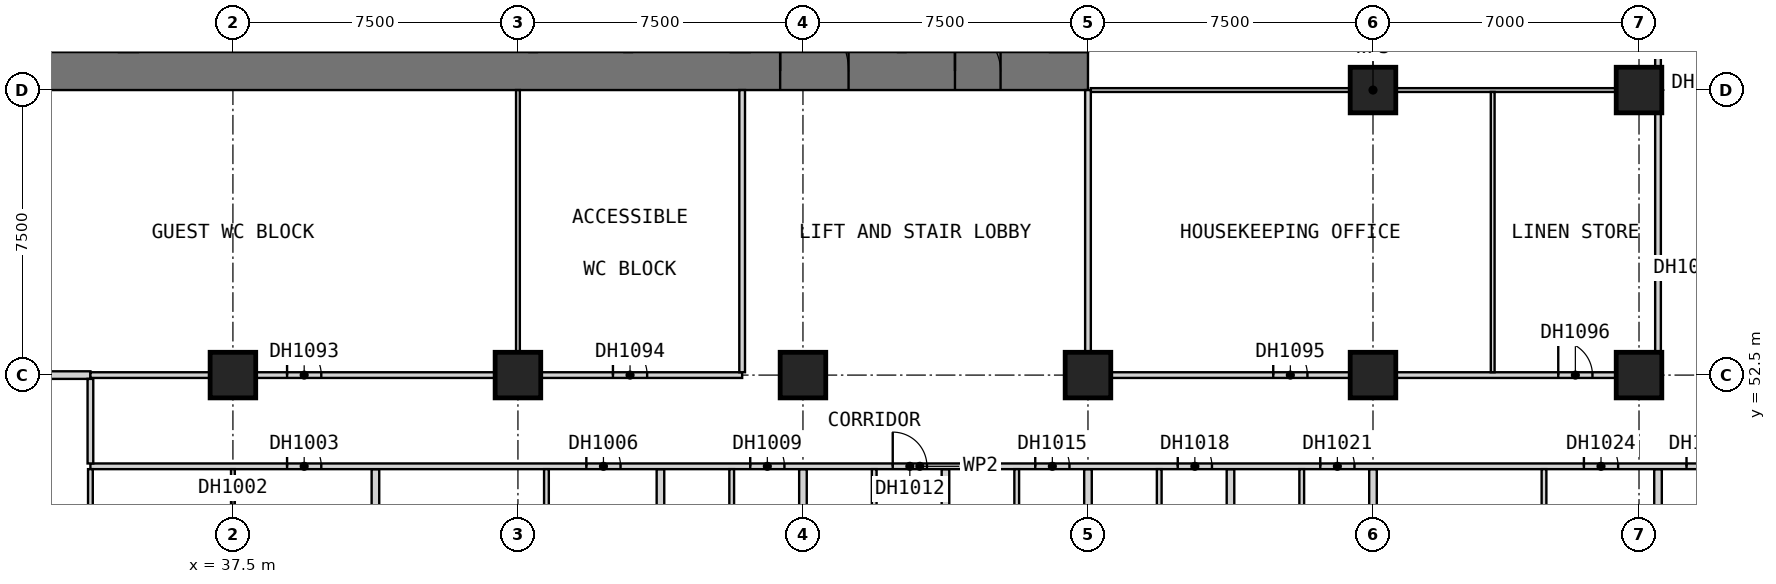
"""IFC4 building model, lengths in metres.
Left out: names, types, materials, properties, quantities, classifications, styles, units other than length and angle.
Written with IfcOpenShell. Run it as: python <this file> out.ifc"""

import sys

from ifc_helpers import new_model, si_unit, direction, frame, frame_2d, origin, origin_2d, place, context, subcontext, project, spatial, rectangle, extrude, element, fill, save


model = new_model("IFC4")
c1 = context("Model", 3, precision=1e-05, world=origin(), true_north=direction((0.0, 1.0)))
c2 = subcontext(c1, "Body", "Model", "MODEL_VIEW")
j1 = project(units=[si_unit("LENGTHUNIT", "METRE"), si_unit("PLANEANGLEUNIT", "RADIAN")], contexts=[c1])
p1 = place(None, origin())
s1 = spatial("IfcSite", under=j1, at=p1, CompositionType="ELEMENT")
p2 = place(p1, origin())
s2 = spatial("IfcBuilding", under=s1, at=p2, CompositionType="ELEMENT")
p3 = place(p2, frame((0.0, 0.0, 48.4)))
s3 = spatial("IfcBuildingStorey", under=s2, at=p3, CompositionType="ELEMENT", Elevation=48.4)
for number, where, z_axis, x_axis in (
    (1, (37.5, 52.5, 0.0), (0.0, 0.0, 1.0), (1.0, 0.0, 0.0)),
    (2, (45.0, 52.5, 0.0), (0.0, 0.0, 1.0), (1.0, 0.0, 0.0)),
    (3, (52.5, 52.5, 0.0), (0.0, 0.0, 1.0), (1.0, 0.0, 0.0)),
    (4, (60.0, 52.5, 0.0), (0.0, 0.0, 1.0), (1.0, 0.0, 0.0)),
    (5, (67.5, 52.5, 0.0), (0.0, 0.0, 1.0), (1.0, 0.0, 0.0)),
    (6, (67.5, 60.0, 0.0), (0.0, 0.0, 1.0), (1.0, 0.0, 0.0)),
    (7, (74.5, 52.5, 0.0), (0.0, 0.0, 1.0), (1.0, 0.0, 0.0)),
    (8, (74.5, 60.0, 0.0), (0.0, 0.0, 1.0), (1.0, 0.0, 0.0)),
):
    element("IfcColumn", number, at=place(p3, frame(where, z_axis=z_axis, x_axis=x_axis)), inside=s3, PredefinedType="COLUMN", context=c2, shape_type="SweptSolid", body=[
        extrude(rectangle(XDim=1.2, YDim=1.2, at=origin_2d()), origin(), (0.0, 0.0, 1.0), 3.6),
    ])
p4 = place(p3, frame((30.0, 60.5, 0.0), z_axis=(0.0, 0.0, 1.0), x_axis=(1.0, 0.0, 0.0)))
e9 = element("IfcWall", 9, at=p4, inside=s3, PredefinedType="SHEAR", context=c2, shape_type="SweptSolid", body=[
    extrude(rectangle(XDim=30.0, YDim=1.0, at=frame_2d((15.0, 0.0))), origin(), (0.0, 0.0, 1.0), 3.6),
])
p5 = place(p4, frame((21.9, 0.0, 0.0)))
e10 = element("IfcOpeningElement", 10, at=p5, cuts=e9, PredefinedType="OPENING", context=c2, shape_type="SweptSolid", body=[
    extrude(rectangle(XDim=1.8, YDim=2.1, at=frame_2d((0.9, 1.05))), frame((0.0, 0.51, 0.0), z_axis=(0.0, -1.0, 0.0), x_axis=(1.0, 0.0, 0.0)), (0.0, 0.0, 1.0), 1.02),
])
p6 = place(p4, frame((26.5, 0.0, 0.0)))
e11 = element("IfcOpeningElement", 11, at=p6, cuts=e9, PredefinedType="OPENING", context=c2, shape_type="SweptSolid", body=[
    extrude(rectangle(XDim=1.2, YDim=2.1, at=frame_2d((0.6, 1.05))), frame((0.0, 0.51, 0.0), z_axis=(0.0, -1.0, 0.0), x_axis=(1.0, 0.0, 0.0)), (0.0, 0.0, 1.0), 1.02),
])
p7 = place(p3, frame((30.0, 52.5, 0.0), z_axis=(0.0, 0.0, 1.0), x_axis=(1.0, 0.0, 0.0)))
e12 = element("IfcWall", 12, at=p7, inside=s3, PredefinedType="PARTITIONING", context=c2, shape_type="SweptSolid", body=[
    extrude(rectangle(XDim=3.75, YDim=0.2, at=frame_2d((1.875, 0.0))), origin(), (0.0, 0.0, 1.0), 3.35),
])
for number, where, z_axis, x_axis in (
    (13, (41.25, 38.31, 0.0), (0.0, 0.0, 1.0), (0.0, 1.0, 0.0)),
    (14, (48.75, 38.31, 0.0), (0.0, 0.0, 1.0), (0.0, 1.0, 0.0)),
):
    element("IfcWall", number, at=place(p3, frame(where, z_axis=z_axis, x_axis=x_axis)), inside=s3, PredefinedType="PARTITIONING", context=c2, shape_type="SweptSolid", body=[
        extrude(rectangle(XDim=11.715, YDim=0.2, at=frame_2d((5.857, 0.0))), origin(), (0.0, 0.0, 1.0), 3.35),
    ])
p8 = place(p3, frame((52.5, 37.5, 0.0), z_axis=(0.0, 0.0, 1.0), x_axis=(0.0, 1.0, 0.0)))
e15 = element("IfcWall", 15, at=p8, inside=s3, PredefinedType="PARTITIONING", context=c2, shape_type="SweptSolid", body=[
    extrude(rectangle(XDim=12.525, YDim=0.2, at=frame_2d((6.262, 0.0))), origin(), (0.0, 0.0, 1.0), 3.35),
])
p9 = place(p3, frame((56.25, 38.31, 0.0), z_axis=(0.0, 0.0, 1.0), x_axis=(0.0, 1.0, 0.0)))
e16 = element("IfcWall", 16, at=p9, inside=s3, PredefinedType="PARTITIONING", context=c2, shape_type="SweptSolid", body=[
    extrude(rectangle(XDim=11.715, YDim=0.2, at=frame_2d((5.857, 0.0))), origin(), (0.0, 0.0, 1.0), 3.35),
])
p10 = place(p3, frame((60.0, 37.5, 0.0), z_axis=(0.0, 0.0, 1.0), x_axis=(0.0, 1.0, 0.0)))
e17 = element("IfcWall", 17, at=p10, inside=s3, PredefinedType="PARTITIONING", context=c2, shape_type="SweptSolid", body=[
    extrude(rectangle(XDim=12.525, YDim=0.2, at=frame_2d((6.262, 0.0))), origin(), (0.0, 0.0, 1.0), 3.35),
])
p11 = place(p3, frame((63.75, 38.31, 0.0), z_axis=(0.0, 0.0, 1.0), x_axis=(0.0, 1.0, 0.0)))
e18 = element("IfcWall", 18, at=p11, inside=s3, PredefinedType="PARTITIONING", context=c2, shape_type="SweptSolid", body=[
    extrude(rectangle(XDim=11.715, YDim=0.2, at=frame_2d((5.857, 0.0))), origin(), (0.0, 0.0, 1.0), 3.35),
])
p12 = place(p3, frame((67.5, 37.5, 0.0), z_axis=(0.0, 0.0, 1.0), x_axis=(0.0, 1.0, 0.0)))
e19 = element("IfcWall", 19, at=p12, inside=s3, PredefinedType="PARTITIONING", context=c2, shape_type="SweptSolid", body=[
    extrude(rectangle(XDim=12.525, YDim=0.2, at=frame_2d((6.262, 0.0))), origin(), (0.0, 0.0, 1.0), 3.35),
])
p13 = place(p3, frame((75.0, 38.31, 0.0), z_axis=(0.0, 0.0, 1.0), x_axis=(0.0, 1.0, 0.0)))
e20 = element("IfcWall", 20, at=p13, inside=s3, PredefinedType="PARTITIONING", context=c2, shape_type="SweptSolid", body=[
    extrude(rectangle(XDim=11.715, YDim=0.2, at=frame_2d((5.857, 0.0))), origin(), (0.0, 0.0, 1.0), 3.35),
])
p14 = place(p3, frame((33.75, 50.1, 0.0), z_axis=(0.0, 0.0, 1.0), x_axis=(1.0, 0.0, 0.0)))
e21 = element("IfcWall", 21, at=p14, inside=s3, PredefinedType="PARTITIONING", context=c2, shape_type="SweptSolid", body=[
    extrude(rectangle(XDim=43.65, YDim=0.15, at=frame_2d((21.825, 0.0))), origin(), (0.0, 0.0, 1.0), 3.35),
])
p15 = place(p14, frame((5.175, 0.0, 0.0)))
e22 = element("IfcOpeningElement", 22, at=p15, cuts=e21, PredefinedType="OPENING", context=c2, shape_type="SweptSolid", body=[
    extrude(rectangle(XDim=0.9, YDim=2.1, at=frame_2d((0.45, 1.05))), frame((0.0, 0.085, 0.0), z_axis=(0.0, -1.0, 0.0), x_axis=(1.0, 0.0, 0.0)), (0.0, 0.0, 1.0), 0.17),
])
p16 = place(p14, frame((13.05, 0.0, 0.0)))
e23 = element("IfcOpeningElement", 23, at=p16, cuts=e21, PredefinedType="OPENING", context=c2, shape_type="SweptSolid", body=[
    extrude(rectangle(XDim=0.9, YDim=2.1, at=frame_2d((0.45, 1.05))), frame((0.0, 0.085, 0.0), z_axis=(0.0, -1.0, 0.0), x_axis=(1.0, 0.0, 0.0)), (0.0, 0.0, 1.0), 0.17),
])
p17 = place(p14, frame((17.363, 0.0, 0.0)))
e24 = element("IfcOpeningElement", 24, at=p17, cuts=e21, PredefinedType="OPENING", context=c2, shape_type="SweptSolid", body=[
    extrude(rectangle(XDim=0.9, YDim=2.1, at=frame_2d((0.45, 1.05))), frame((0.0, 0.085, 0.0), z_axis=(0.0, -1.0, 0.0), x_axis=(1.0, 0.0, 0.0)), (0.0, 0.0, 1.0), 0.17),
])
p18 = place(p14, frame((21.113, 0.0, 0.0)))
e25 = element("IfcOpeningElement", 25, at=p18, cuts=e21, PredefinedType="OPENING", context=c2, shape_type="SweptSolid", body=[
    extrude(rectangle(XDim=0.9, YDim=2.1, at=frame_2d((0.45, 1.05))), frame((0.0, 0.085, 0.0), z_axis=(0.0, -1.0, 0.0), x_axis=(1.0, 0.0, 0.0)), (0.0, 0.0, 1.0), 0.17),
])
p19 = place(p14, frame((24.863, 0.0, 0.0)))
e26 = element("IfcOpeningElement", 26, at=p19, cuts=e21, PredefinedType="OPENING", context=c2, shape_type="SweptSolid", body=[
    extrude(rectangle(XDim=0.9, YDim=2.1, at=frame_2d((0.45, 1.05))), frame((0.0, 0.085, 0.0), z_axis=(0.0, -1.0, 0.0), x_axis=(1.0, 0.0, 0.0)), (0.0, 0.0, 1.0), 0.17),
])
p20 = place(p14, frame((28.613, 0.0, 0.0)))
e27 = element("IfcOpeningElement", 27, at=p20, cuts=e21, PredefinedType="OPENING", context=c2, shape_type="SweptSolid", body=[
    extrude(rectangle(XDim=0.9, YDim=2.1, at=frame_2d((0.45, 1.05))), frame((0.0, 0.085, 0.0), z_axis=(0.0, -1.0, 0.0), x_axis=(1.0, 0.0, 0.0)), (0.0, 0.0, 1.0), 0.17),
])
p21 = place(p14, frame((32.363, 0.0, 0.0)))
e28 = element("IfcOpeningElement", 28, at=p21, cuts=e21, PredefinedType="OPENING", context=c2, shape_type="SweptSolid", body=[
    extrude(rectangle(XDim=0.9, YDim=2.1, at=frame_2d((0.45, 1.05))), frame((0.0, 0.085, 0.0), z_axis=(0.0, -1.0, 0.0), x_axis=(1.0, 0.0, 0.0)), (0.0, 0.0, 1.0), 0.17),
])
p22 = place(p14, frame((39.3, 0.0, 0.0)))
e29 = element("IfcOpeningElement", 29, at=p22, cuts=e21, PredefinedType="OPENING", context=c2, shape_type="SweptSolid", body=[
    extrude(rectangle(XDim=0.9, YDim=2.1, at=frame_2d((0.45, 1.05))), frame((0.0, 0.085, 0.0), z_axis=(0.0, -1.0, 0.0), x_axis=(1.0, 0.0, 0.0)), (0.0, 0.0, 1.0), 0.17),
])
p23 = place(p14, frame((42.0, 0.0, 0.0)))
e30 = element("IfcOpeningElement", 30, at=p23, cuts=e21, PredefinedType="OPENING", context=c2, shape_type="SweptSolid", body=[
    extrude(rectangle(XDim=0.9, YDim=2.1, at=frame_2d((0.45, 1.05))), frame((0.0, 0.085, 0.0), z_axis=(0.0, -1.0, 0.0), x_axis=(1.0, 0.0, 0.0)), (0.0, 0.0, 1.0), 0.17),
])
p24 = place(p3, frame((33.75, 52.5, 0.0), z_axis=(0.0, 0.0, 1.0), x_axis=(1.0, 0.0, 0.0)))
e31 = element("IfcWall", 31, at=p24, inside=s3, PredefinedType="PARTITIONING", context=c2, shape_type="SweptSolid", body=[
    extrude(rectangle(XDim=17.15, YDim=0.15, at=frame_2d((8.575, 0.0))), origin(), (0.0, 0.0, 1.0), 3.35),
])
p25 = place(p24, frame((5.175, 0.0, 0.0)))
e32 = element("IfcOpeningElement", 32, at=p25, cuts=e31, PredefinedType="OPENING", context=c2, shape_type="SweptSolid", body=[
    extrude(rectangle(XDim=0.9, YDim=2.1, at=frame_2d((0.45, 1.05))), frame((0.0, 0.085, 0.0), z_axis=(0.0, -1.0, 0.0), x_axis=(1.0, 0.0, 0.0)), (0.0, 0.0, 1.0), 0.17),
])
p26 = place(p24, frame((13.75, 0.0, 0.0)))
e33 = element("IfcOpeningElement", 33, at=p26, cuts=e31, PredefinedType="OPENING", context=c2, shape_type="SweptSolid", body=[
    extrude(rectangle(XDim=0.9, YDim=2.1, at=frame_2d((0.45, 1.05))), frame((0.0, 0.085, 0.0), z_axis=(0.0, -1.0, 0.0), x_axis=(1.0, 0.0, 0.0)), (0.0, 0.0, 1.0), 0.17),
])
p27 = place(p3, frame((60.0, 52.5, 0.0), z_axis=(0.0, 0.0, 1.0), x_axis=(1.0, 0.0, 0.0)))
e34 = element("IfcWall", 34, at=p27, inside=s3, PredefinedType="PARTITIONING", context=c2, shape_type="SweptSolid", body=[
    extrude(rectangle(XDim=15.0, YDim=0.15, at=frame_2d((7.5, 0.0))), origin(), (0.0, 0.0, 1.0), 3.35),
])
p28 = place(p27, frame((4.875, 0.0, 0.0)))
e35 = element("IfcOpeningElement", 35, at=p28, cuts=e34, PredefinedType="OPENING", context=c2, shape_type="SweptSolid", body=[
    extrude(rectangle(XDim=0.9, YDim=2.1, at=frame_2d((0.45, 1.05))), frame((0.0, 0.085, 0.0), z_axis=(0.0, -1.0, 0.0), x_axis=(1.0, 0.0, 0.0)), (0.0, 0.0, 1.0), 0.17),
])
p29 = place(p27, frame((12.375, 0.0, 0.0)))
e36 = element("IfcOpeningElement", 36, at=p29, cuts=e34, PredefinedType="OPENING", context=c2, shape_type="SweptSolid", body=[
    extrude(rectangle(XDim=0.9, YDim=2.1, at=frame_2d((0.45, 1.05))), frame((0.0, 0.085, 0.0), z_axis=(0.0, -1.0, 0.0), x_axis=(1.0, 0.0, 0.0)), (0.0, 0.0, 1.0), 0.17),
])
p30 = place(p3, frame((33.75, 50.175, 0.0), z_axis=(0.0, 0.0, 1.0), x_axis=(0.0, 1.0, 0.0)))
e37 = element("IfcWall", 37, at=p30, inside=s3, PredefinedType="PARTITIONING", context=c2, shape_type="SweptSolid", body=[
    extrude(rectangle(XDim=2.225, YDim=0.15, at=frame_2d((1.112, 0.0))), origin(), (0.0, 0.0, 1.0), 3.35),
])
p31 = place(p3, frame((75.0, 52.575, 0.0), z_axis=(0.0, 0.0, 1.0), x_axis=(0.0, 1.0, 0.0)))
e38 = element("IfcWall", 38, at=p31, inside=s3, PredefinedType="PARTITIONING", context=c2, shape_type="SweptSolid", body=[
    extrude(rectangle(XDim=11.85, YDim=0.15, at=frame_2d((5.925, 0.0))), origin(), (0.0, 0.0, 1.0), 3.35),
])
p32 = place(p31, frame((9.225, 0.0, 0.0)))
e39 = element("IfcOpeningElement", 39, at=p32, cuts=e38, PredefinedType="OPENING", context=c2, shape_type="SweptSolid", body=[
    extrude(rectangle(XDim=0.9, YDim=2.1, at=frame_2d((0.45, 1.05))), frame((0.0, 0.085, 0.0), z_axis=(0.0, -1.0, 0.0), x_axis=(1.0, 0.0, 0.0)), (0.0, 0.0, 1.0), 0.17),
])
p33 = place(p3, frame((60.075, 60.0, 0.0), z_axis=(0.0, 0.0, 1.0), x_axis=(1.0, 0.0, 0.0)))
e40 = element("IfcWall", 40, at=p33, inside=s3, PredefinedType="PARTITIONING", context=c2, shape_type="SweptSolid", body=[
    extrude(rectangle(XDim=14.85, YDim=0.1, at=frame_2d((7.425, 0.0))), origin(), (0.0, 0.0, 1.0), 3.35),
])
p34 = place(p3, frame((37.5, 45.8, 0.0), z_axis=(0.0, 0.0, 1.0), x_axis=(0.0, 1.0, 0.0)))
e41 = element("IfcWall", 41, at=p34, inside=s3, PredefinedType="PARTITIONING", context=c2, shape_type="SweptSolid", body=[
    extrude(rectangle(XDim=4.225, YDim=0.1, at=frame_2d((2.112, 0.0))), origin(), (0.0, 0.0, 1.0), 3.35),
])
p35 = place(p34, frame((1.675, 0.0, 0.0)))
e42 = element("IfcOpeningElement", 42, at=p35, cuts=e41, PredefinedType="OPENING", context=c2, shape_type="SweptSolid", body=[
    extrude(rectangle(XDim=0.9, YDim=2.1, at=frame_2d((0.45, 1.05))), frame((0.0, 0.06, 0.0), z_axis=(0.0, -1.0, 0.0), x_axis=(1.0, 0.0, 0.0)), (0.0, 0.0, 1.0), 0.12),
])
p36 = place(p3, frame((45.0, 52.575, 0.0), z_axis=(0.0, 0.0, 1.0), x_axis=(0.0, 1.0, 0.0)))
e43 = element("IfcWall", 43, at=p36, inside=s3, PredefinedType="PARTITIONING", context=c2, shape_type="SweptSolid", body=[
    extrude(rectangle(XDim=7.425, YDim=0.1, at=frame_2d((3.712, 0.0))), origin(), (0.0, 0.0, 1.0), 3.35),
])
p37 = place(p3, frame((70.65, 52.575, 0.0), z_axis=(0.0, 0.0, 1.0), x_axis=(0.0, 1.0, 0.0)))
e44 = element("IfcWall", 44, at=p37, inside=s3, PredefinedType="PARTITIONING", context=c2, shape_type="SweptSolid", body=[
    extrude(rectangle(XDim=7.375, YDim=0.1, at=frame_2d((3.688, 0.0))), origin(), (0.0, 0.0, 1.0), 3.35),
])
for number, where, z_axis, x_axis in (
    (45, (33.75, 45.812, 0.0), (0.0, 0.0, 1.0), (0.0, 1.0, 0.0)),
    (46, (45.75, 45.812, 0.0), (0.0, 0.0, 1.0), (0.0, 1.0, 0.0)),
    (47, (50.625, 45.812, 0.0), (0.0, 0.0, 1.0), (0.0, 1.0, 0.0)),
    (48, (54.375, 45.812, 0.0), (0.0, 0.0, 1.0), (0.0, 1.0, 0.0)),
    (49, (58.125, 45.812, 0.0), (0.0, 0.0, 1.0), (0.0, 1.0, 0.0)),
    (50, (61.875, 45.812, 0.0), (0.0, 0.0, 1.0), (0.0, 1.0, 0.0)),
    (51, (65.625, 45.812, 0.0), (0.0, 0.0, 1.0), (0.0, 1.0, 0.0)),
    (52, (72.0, 45.812, 0.0), (0.0, 0.0, 1.0), (0.0, 1.0, 0.0)),
):
    element("IfcWall", number, at=place(p3, frame(where, z_axis=z_axis, x_axis=x_axis)), inside=s3, PredefinedType="PARTITIONING", context=c2, shape_type="SweptSolid", body=[
        extrude(rectangle(XDim=4.212, YDim=0.125, at=frame_2d((2.106, 0.0))), origin(), (0.0, 0.0, 1.0), 3.35),
    ])
for number, where, z_axis, x_axis in (
    (53, (50.9, 52.575, 0.0), (0.0, 0.0, 1.0), (0.0, 1.0, 0.0)),
    (54, (60.0, 52.575, 0.0), (0.0, 0.0, 1.0), (0.0, 1.0, 0.0)),
):
    element("IfcWall", number, at=place(p3, frame(where, z_axis=z_axis, x_axis=x_axis)), inside=s3, PredefinedType="PARTITIONING", context=c2, shape_type="SweptSolid", body=[
        extrude(rectangle(XDim=7.425, YDim=0.15, at=frame_2d((3.712, 0.0))), origin(), (0.0, 0.0, 1.0), 3.35),
    ])
p38 = place(p5, origin())
e55 = element("IfcDoor", 55, at=p38, inside=s3, OperationType="DOUBLE_DOOR_SINGLE_SWING", PredefinedType="DOOR", context=c2, shape_type="SweptSolid", body=[
    extrude(rectangle(XDim=1.8, YDim=2.1, at=frame_2d((0.9, 1.05))), frame((0.0, 0.025, 0.0), z_axis=(0.0, -1.0, 0.0), x_axis=(1.0, 0.0, 0.0)), (0.0, 0.0, 1.0), 0.05),
])
fill(e10, e55)
p39 = place(p6, origin())
e56 = element("IfcDoor", 56, at=p39, inside=s3, OperationType="SINGLE_SWING_LEFT", PredefinedType="DOOR", context=c2, shape_type="SweptSolid", body=[
    extrude(rectangle(XDim=1.2, YDim=2.1, at=frame_2d((0.6, 1.05))), frame((0.0, 0.025, 0.0), z_axis=(0.0, -1.0, 0.0), x_axis=(1.0, 0.0, 0.0)), (0.0, 0.0, 1.0), 0.05),
])
fill(e11, e56)
p40 = place(p15, origin())
e57 = element("IfcDoor", 57, at=p40, inside=s3, OperationType="SINGLE_SWING_RIGHT", PredefinedType="DOOR", context=c2, shape_type="SweptSolid", body=[
    extrude(rectangle(XDim=0.9, YDim=2.1, at=frame_2d((0.45, 1.05))), frame((0.0, 0.025, 0.0), z_axis=(0.0, -1.0, 0.0), x_axis=(1.0, 0.0, 0.0)), (0.0, 0.0, 1.0), 0.05),
])
fill(e22, e57)
p41 = place(p16, origin())
e58 = element("IfcDoor", 58, at=p41, inside=s3, OperationType="SINGLE_SWING_RIGHT", PredefinedType="DOOR", context=c2, shape_type="SweptSolid", body=[
    extrude(rectangle(XDim=0.9, YDim=2.1, at=frame_2d((0.45, 1.05))), frame((0.0, 0.025, 0.0), z_axis=(0.0, -1.0, 0.0), x_axis=(1.0, 0.0, 0.0)), (0.0, 0.0, 1.0), 0.05),
])
fill(e23, e58)
p42 = place(p17, origin())
e59 = element("IfcDoor", 59, at=p42, inside=s3, OperationType="SINGLE_SWING_RIGHT", PredefinedType="DOOR", context=c2, shape_type="SweptSolid", body=[
    extrude(rectangle(XDim=0.9, YDim=2.1, at=frame_2d((0.45, 1.05))), frame((0.0, 0.025, 0.0), z_axis=(0.0, -1.0, 0.0), x_axis=(1.0, 0.0, 0.0)), (0.0, 0.0, 1.0), 0.05),
])
fill(e24, e59)
p43 = place(p18, origin())
e60 = element("IfcDoor", 60, at=p43, inside=s3, OperationType="SINGLE_SWING_RIGHT", PredefinedType="DOOR", context=c2, shape_type="SweptSolid", body=[
    extrude(rectangle(XDim=0.9, YDim=2.1, at=frame_2d((0.45, 1.05))), frame((0.0, 0.025, 0.0), z_axis=(0.0, -1.0, 0.0), x_axis=(1.0, 0.0, 0.0)), (0.0, 0.0, 1.0), 0.05),
])
fill(e25, e60)
p44 = place(p19, origin())
e61 = element("IfcDoor", 61, at=p44, inside=s3, OperationType="SINGLE_SWING_RIGHT", PredefinedType="DOOR", context=c2, shape_type="SweptSolid", body=[
    extrude(rectangle(XDim=0.9, YDim=2.1, at=frame_2d((0.45, 1.05))), frame((0.0, 0.025, 0.0), z_axis=(0.0, -1.0, 0.0), x_axis=(1.0, 0.0, 0.0)), (0.0, 0.0, 1.0), 0.05),
])
fill(e26, e61)
p45 = place(p20, origin())
e62 = element("IfcDoor", 62, at=p45, inside=s3, OperationType="SINGLE_SWING_RIGHT", PredefinedType="DOOR", context=c2, shape_type="SweptSolid", body=[
    extrude(rectangle(XDim=0.9, YDim=2.1, at=frame_2d((0.45, 1.05))), frame((0.0, 0.025, 0.0), z_axis=(0.0, -1.0, 0.0), x_axis=(1.0, 0.0, 0.0)), (0.0, 0.0, 1.0), 0.05),
])
fill(e27, e62)
p46 = place(p21, origin())
e63 = element("IfcDoor", 63, at=p46, inside=s3, OperationType="SINGLE_SWING_RIGHT", PredefinedType="DOOR", context=c2, shape_type="SweptSolid", body=[
    extrude(rectangle(XDim=0.9, YDim=2.1, at=frame_2d((0.45, 1.05))), frame((0.0, 0.025, 0.0), z_axis=(0.0, -1.0, 0.0), x_axis=(1.0, 0.0, 0.0)), (0.0, 0.0, 1.0), 0.05),
])
fill(e28, e63)
p47 = place(p22, origin())
e64 = element("IfcDoor", 64, at=p47, inside=s3, OperationType="SINGLE_SWING_RIGHT", PredefinedType="DOOR", context=c2, shape_type="SweptSolid", body=[
    extrude(rectangle(XDim=0.9, YDim=2.1, at=frame_2d((0.45, 1.05))), frame((0.0, 0.025, 0.0), z_axis=(0.0, -1.0, 0.0), x_axis=(1.0, 0.0, 0.0)), (0.0, 0.0, 1.0), 0.05),
])
fill(e29, e64)
p48 = place(p23, origin())
e65 = element("IfcDoor", 65, at=p48, inside=s3, OperationType="SINGLE_SWING_LEFT", PredefinedType="DOOR", context=c2, shape_type="SweptSolid", body=[
    extrude(rectangle(XDim=0.9, YDim=2.1, at=frame_2d((0.45, 1.05))), frame((0.0, 0.025, 0.0), z_axis=(0.0, -1.0, 0.0), x_axis=(1.0, 0.0, 0.0)), (0.0, 0.0, 1.0), 0.05),
])
fill(e30, e65)
p49 = place(p25, origin())
e66 = element("IfcDoor", 66, at=p49, inside=s3, OperationType="SINGLE_SWING_LEFT", PredefinedType="DOOR", context=c2, shape_type="SweptSolid", body=[
    extrude(rectangle(XDim=0.9, YDim=2.1, at=frame_2d((0.45, 1.05))), frame((0.0, 0.025, 0.0), z_axis=(0.0, -1.0, 0.0), x_axis=(1.0, 0.0, 0.0)), (0.0, 0.0, 1.0), 0.05),
])
fill(e32, e66)
p50 = place(p26, origin())
e67 = element("IfcDoor", 67, at=p50, inside=s3, OperationType="SINGLE_SWING_LEFT", PredefinedType="DOOR", context=c2, shape_type="SweptSolid", body=[
    extrude(rectangle(XDim=0.9, YDim=2.1, at=frame_2d((0.45, 1.05))), frame((0.0, 0.025, 0.0), z_axis=(0.0, -1.0, 0.0), x_axis=(1.0, 0.0, 0.0)), (0.0, 0.0, 1.0), 0.05),
])
fill(e33, e67)
p51 = place(p28, origin())
e68 = element("IfcDoor", 68, at=p51, inside=s3, OperationType="SINGLE_SWING_RIGHT", PredefinedType="DOOR", context=c2, shape_type="SweptSolid", body=[
    extrude(rectangle(XDim=0.9, YDim=2.1, at=frame_2d((0.45, 1.05))), frame((0.0, 0.025, 0.0), z_axis=(0.0, -1.0, 0.0), x_axis=(1.0, 0.0, 0.0)), (0.0, 0.0, 1.0), 0.05),
])
fill(e35, e68)
p52 = place(p29, origin())
e69 = element("IfcDoor", 69, at=p52, inside=s3, OperationType="SINGLE_SWING_RIGHT", PredefinedType="DOOR", context=c2, shape_type="SweptSolid", body=[
    extrude(rectangle(XDim=0.9, YDim=2.1, at=frame_2d((0.45, 1.05))), frame((0.0, 0.025, 0.0), z_axis=(0.0, -1.0, 0.0), x_axis=(1.0, 0.0, 0.0)), (0.0, 0.0, 1.0), 0.05),
])
fill(e36, e69)
save(model, sys.argv[1])
